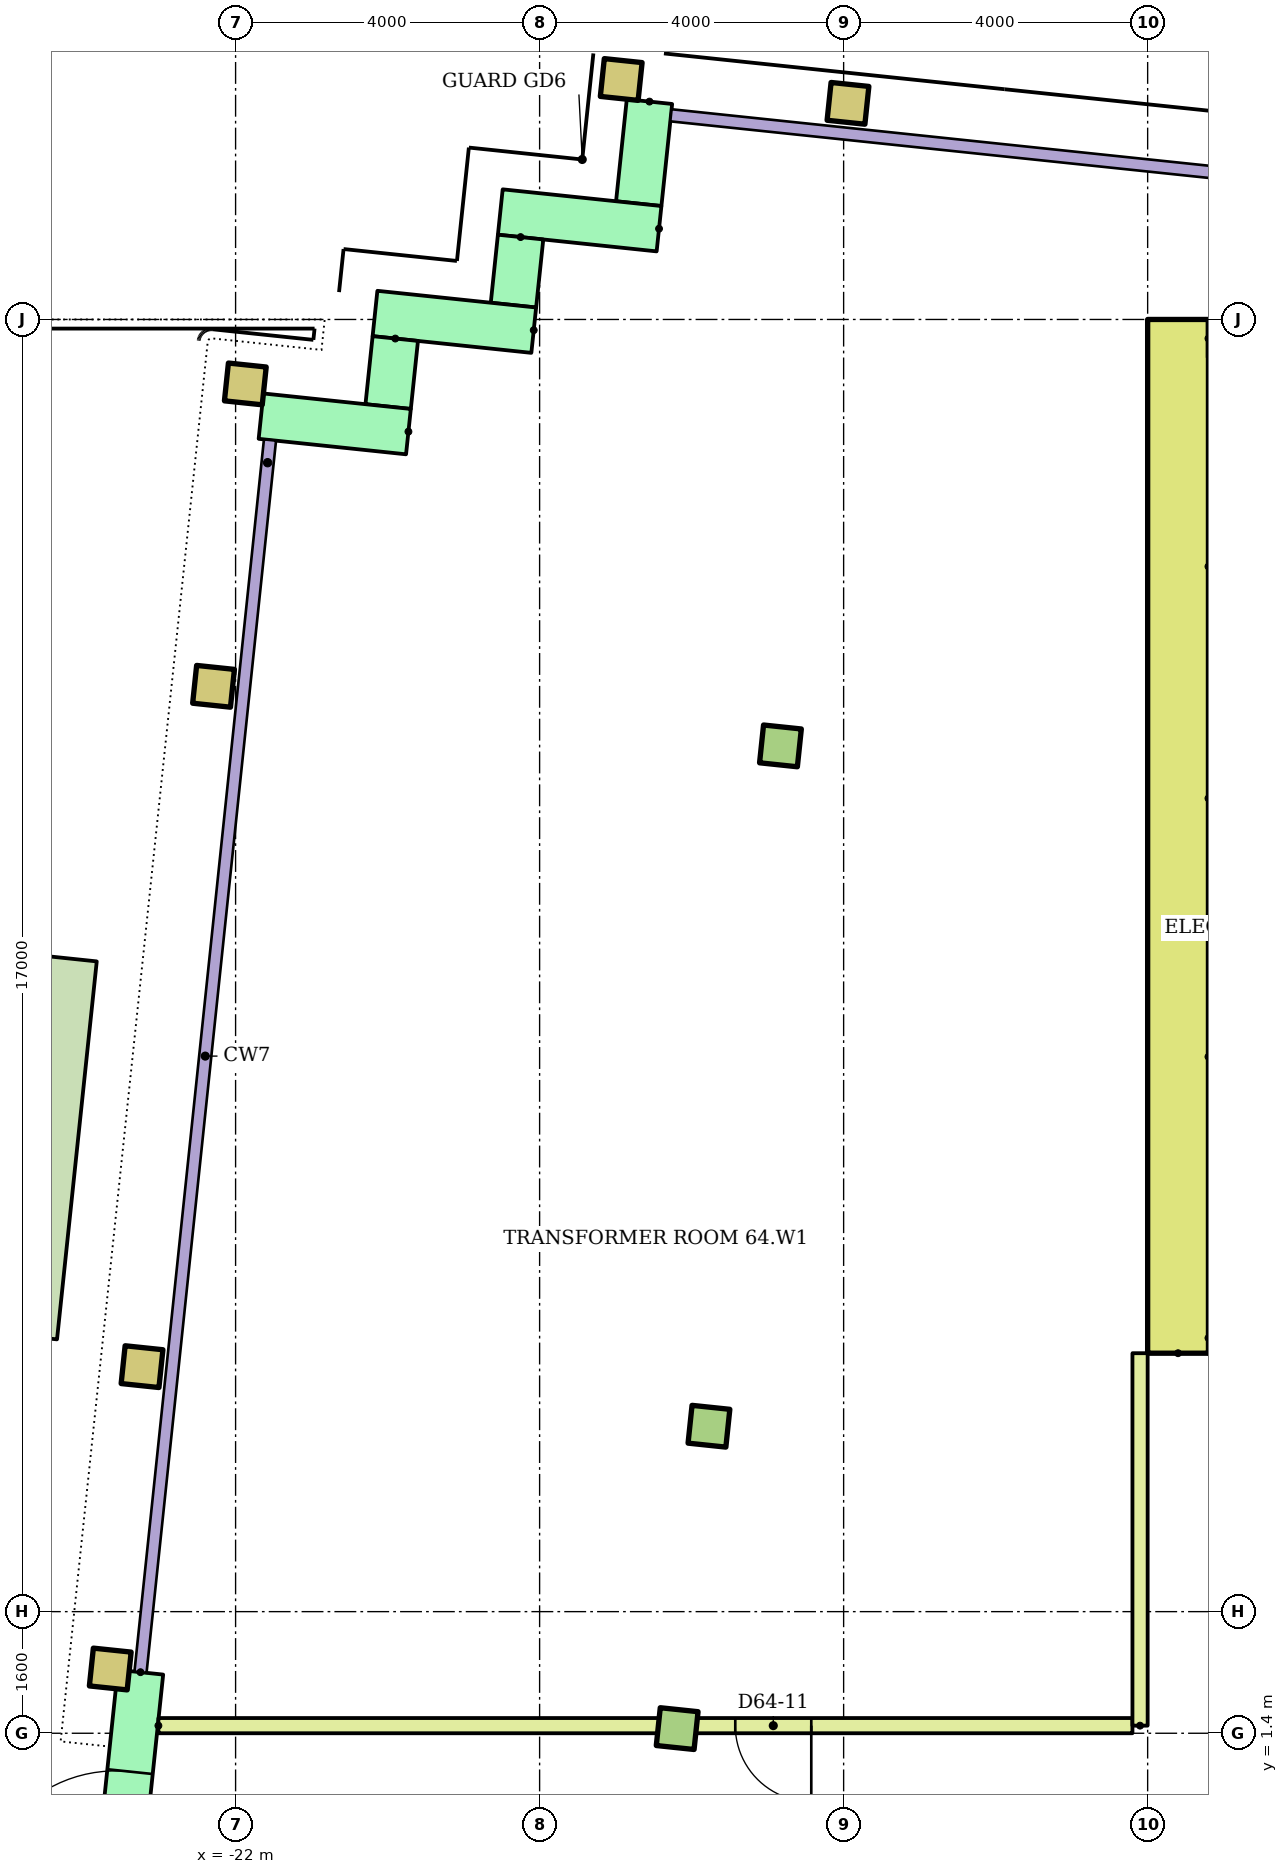
"""IFC4 building model, lengths in metres.
Left out: names, types, materials, properties, quantities, classifications, styles, units other than length and angle.
Written with IfcOpenShell. Run it as: python <this file> out.ifc"""

import sys

from ifc_helpers import new_model, si_unit, direction, frame, frame_2d, origin, origin_2d, place, context, subcontext, project, spatial, rectangle, hollow_rectangle, extrude, element, fill, save


model = new_model("IFC4")
c1 = context("Model", 3, precision=1e-05, world=origin(), true_north=direction((0.0, 1.0)))
c2 = subcontext(c1, "Body", "Model", "MODEL_VIEW")
j1 = project(units=[si_unit("LENGTHUNIT", "METRE"), si_unit("PLANEANGLEUNIT", "RADIAN")], contexts=[c1])
p1 = place(None, origin())
s1 = spatial("IfcSite", under=j1, at=p1, CompositionType="ELEMENT")
p2 = place(p1, origin())
s2 = spatial("IfcBuilding", under=s1, at=p2, CompositionType="ELEMENT")
p3 = place(p2, frame((0.0, 0.0, 249.2)))
s3 = spatial("IfcBuildingStorey", under=s2, at=p3, CompositionType="ELEMENT", Elevation=249.2)
p4 = place(p3, frame((-23.649, 2.245, 0.0), z_axis=(0.0, 0.0, 1.0), x_axis=(0.994521895368, -0.104528463268, 0.0)))
e1 = element("IfcColumn", 1, at=p4, inside=s3, PredefinedType="COLUMN", context=c2, shape_type="SweptSolid", body=[
    extrude(hollow_rectangle(XDim=0.5, YDim=0.5, WallThickness=0.025, at=origin_2d()), origin(), (0.0, 0.0, 1.0), 3.9),
])
p5 = place(p3, frame((-16.19, 1.461, 0.0), z_axis=(0.0, 0.0, 1.0), x_axis=(0.994521895368, -0.104528463268, 0.0)))
e2 = element("IfcColumn", 2, at=p5, inside=s3, PredefinedType="COLUMN", context=c2, shape_type="SweptSolid", body=[
    extrude(rectangle(XDim=0.5, YDim=0.5, at=origin_2d()), origin(), (0.0, 0.0, 1.0), 3.9),
])
p6 = place(p3, frame((-23.231, 6.223, 0.0), z_axis=(0.0, 0.0, 1.0), x_axis=(0.994521895368, -0.104528463268, 0.0)))
e3 = element("IfcColumn", 3, at=p6, inside=s3, PredefinedType="COLUMN", context=c2, shape_type="SweptSolid", body=[
    extrude(hollow_rectangle(XDim=0.5, YDim=0.5, WallThickness=0.025, at=origin_2d()), origin(), (0.0, 0.0, 1.0), 3.9),
])
p7 = place(p3, frame((-15.772, 5.439, 0.0), z_axis=(0.0, 0.0, 1.0), x_axis=(0.994521895368, -0.104528463268, 0.0)))
e4 = element("IfcColumn", 4, at=p7, inside=s3, PredefinedType="COLUMN", context=c2, shape_type="SweptSolid", body=[
    extrude(rectangle(XDim=0.5, YDim=0.5, at=origin_2d()), origin(), (0.0, 0.0, 1.0), 3.9),
])
p8 = place(p3, frame((-22.29, 15.174, 0.0), z_axis=(0.0, 0.0, 1.0), x_axis=(0.994521895368, -0.104528463268, 0.0)))
e5 = element("IfcColumn", 5, at=p8, inside=s3, PredefinedType="COLUMN", context=c2, shape_type="SweptSolid", body=[
    extrude(hollow_rectangle(XDim=0.5, YDim=0.5, WallThickness=0.025, at=origin_2d()), origin(), (0.0, 0.0, 1.0), 3.9),
])
p9 = place(p3, frame((-14.831, 14.39, 0.0), z_axis=(0.0, 0.0, 1.0), x_axis=(0.994521895368, -0.104528463268, 0.0)))
e6 = element("IfcColumn", 6, at=p9, inside=s3, PredefinedType="COLUMN", context=c2, shape_type="SweptSolid", body=[
    extrude(rectangle(XDim=0.5, YDim=0.5, at=origin_2d()), origin(), (0.0, 0.0, 1.0), 3.9),
])
for number, where, z_axis, x_axis in (
    (7, (-21.872, 19.152, 0.0), (0.0, 0.0, 1.0), (0.995, -0.105, 0.0)),
    (8, (-16.926, 23.157, 0.0), (0.0, 0.0, 1.0), (0.995, -0.105, 0.0)),
    (9, (-13.943, 22.843, 0.0), (0.0, 0.0, 1.0), (0.995, -0.105, 0.0)),
):
    element("IfcColumn", number, at=place(p3, frame(where, z_axis=z_axis, x_axis=x_axis)), inside=s3, PredefinedType="COLUMN", context=c2, shape_type="SweptSolid", body=[
        extrude(hollow_rectangle(XDim=0.5, YDim=0.5, WallThickness=0.025, at=origin_2d()), origin(), (0.0, 0.0, 1.0), 3.9),
    ])
p10 = place(p3, frame((-16.555, 22.866, 0.0), z_axis=(0.0, 0.0, 1.0), x_axis=(-0.104515354875, -0.994523273029, 0.0)))
e10 = element("IfcWall", 10, at=p10, inside=s3, PredefinedType="STANDARD", context=c2, shape_type="SweptSolid", body=[
    extrude(rectangle(XDim=1.35, YDim=0.6, at=frame_2d((0.675, 0.0))), origin(), (0.0, 0.0, 1.0), 3.62),
])
p11 = place(p3, frame((-16.429, 21.194, 0.0), z_axis=(0.0, 0.0, 1.0), x_axis=(-0.994522640205, 0.104521376379, 0.0)))
e11 = element("IfcWall", 11, at=p11, inside=s3, PredefinedType="STANDARD", context=c2, shape_type="SweptSolid", body=[
    extrude(rectangle(XDim=2.1, YDim=0.6, at=frame_2d((1.05, 0.0))), origin(), (0.0, 0.0, 1.0), 3.62),
])
p12 = place(p3, frame((-18.25, 21.084, 0.0), z_axis=(0.0, 0.0, 1.0), x_axis=(-0.104416541099, -0.994533652495, 0.0)))
e12 = element("IfcWall", 12, at=p12, inside=s3, PredefinedType="STANDARD", context=c2, shape_type="SweptSolid", body=[
    extrude(rectangle(XDim=0.9, YDim=0.6, at=frame_2d((0.45, 0.0))), origin(), (0.0, 0.0, 1.0), 3.62),
])
p13 = place(p3, frame((-18.077, 19.859, 0.0), z_axis=(0.0, 0.0, 1.0), x_axis=(-0.994522640205, 0.104521376379, 0.0)))
e13 = element("IfcWall", 13, at=p13, inside=s3, PredefinedType="STANDARD", context=c2, shape_type="SweptSolid", body=[
    extrude(rectangle(XDim=2.1, YDim=0.6, at=frame_2d((1.05, 0.0))), origin(), (0.0, 0.0, 1.0), 3.62),
])
p14 = place(p3, frame((-19.899, 19.749, 0.0), z_axis=(0.0, 0.0, 1.0), x_axis=(-0.104741284723, -0.994499503909, 0.0)))
e14 = element("IfcWall", 14, at=p14, inside=s3, PredefinedType="STANDARD", context=c2, shape_type="SweptSolid", body=[
    extrude(rectangle(XDim=0.9, YDim=0.6, at=frame_2d((0.45, 0.0))), origin(), (0.0, 0.0, 1.0), 3.62),
])
p15 = place(p3, frame((-19.726, 18.524, 0.0), z_axis=(0.0, 0.0, 1.0), x_axis=(-0.994534226826, 0.104411070641, 0.0)))
e15 = element("IfcWall", 15, at=p15, inside=s3, PredefinedType="STANDARD", context=c2, shape_type="SweptSolid", body=[
    extrude(rectangle(XDim=1.95, YDim=0.6, at=frame_2d((0.975, 0.0))), origin(), (0.0, 0.0, 1.0), 3.62),
])
p16 = place(p3, frame((-23.251, 2.203, 0.0), z_axis=(0.0, 0.0, 1.0), x_axis=(-0.104516482125, -0.994523154564, 0.0)))
e16 = element("IfcWall", 16, at=p16, inside=s3, PredefinedType="STANDARD", context=c2, shape_type="SweptSolid", body=[
    extrude(rectangle(XDim=7.4, YDim=0.6, at=frame_2d((3.7, 0.0))), origin(), (0.0, 0.0, 1.0), 3.62),
])
p17 = place(p16, frame((1.315, 0.0, 0.0)))
e17 = element("IfcOpeningElement", 17, at=p17, cuts=e16, PredefinedType="OPENING", context=c2, shape_type="SweptSolid", body=[
    extrude(rectangle(XDim=1.8, YDim=2.1, at=frame_2d((0.9, 1.05))), frame((0.0, 0.31, 0.0), z_axis=(0.0, -1.0, 0.0), x_axis=(1.0, 0.0, 0.0)), (0.0, 0.0, 1.0), 0.62),
])
p18 = place(p3, frame((-24.622, 11.638, 0.0), z_axis=(0.0, 0.0, 1.0), x_axis=(-0.104544982588, -0.994520158979, 0.0)))
e18 = element("IfcWall", 18, at=p18, inside=s3, PredefinedType="STANDARD", context=c2, shape_type="SweptSolid", body=[
    extrude(rectangle(XDim=5.0, YDim=1.6, at=frame_2d((2.5, 0.0))), origin(), (0.0, 0.0, 1.0), 0.8),
])
p19 = place(p3, frame((-9.6, 6.4, 0.0), z_axis=(0.0, 0.0, 1.0), x_axis=(0.0, 1.0, 0.0)))
e19 = element("IfcWall", 19, at=p19, inside=s3, PredefinedType="SHEAR", context=c2, shape_type="SweptSolid", body=[
    extrude(rectangle(XDim=13.6, YDim=0.8, at=frame_2d((6.8, 0.0))), origin(), (0.0, 0.0, 1.0), 3.62),
])
p20 = place(p3, frame((-23.016, 1.5, 0.0)))
e20 = element("IfcWall", 20, at=p20, inside=s3, PredefinedType="PARTITIONING", context=c2, shape_type="SweptSolid", body=[
    extrude(rectangle(XDim=12.816, YDim=0.2, at=frame_2d((6.408, 0.0))), origin(), (0.0, 0.0, 1.0), 3.62),
])
p21 = place(p20, frame((7.59, 0.0, 0.0)))
e21 = element("IfcOpeningElement", 21, at=p21, cuts=e20, PredefinedType="OPENING", context=c2, shape_type="SweptSolid", body=[
    extrude(rectangle(XDim=1.0, YDim=2.4, at=frame_2d((0.5, 1.2))), frame((0.0, 0.11, 0.0), z_axis=(0.0, -1.0, 0.0), x_axis=(1.0, 0.0, 0.0)), (0.0, 0.0, 1.0), 0.22),
])
p22 = place(p3, frame((-10.1, 1.5, 0.0), z_axis=(0.0, 0.0, 1.0), x_axis=(0.0, 1.0, 0.0)))
e22 = element("IfcWall", 22, at=p22, inside=s3, PredefinedType="PARTITIONING", context=c2, shape_type="SweptSolid", body=[
    extrude(rectangle(XDim=4.9, YDim=0.2, at=frame_2d((2.45, 0.0))), origin(), (0.0, 0.0, 1.0), 3.62),
])
p23 = place(p17, frame((1.8, 0.0, 0.0), z_axis=(0.0, 0.0, 1.0), x_axis=(-1.0, 0.0, 0.0)))
e23 = element("IfcDoor", 23, at=p23, inside=s3, OperationType="DOUBLE_DOOR_SINGLE_SWING", PredefinedType="DOOR", context=c2, shape_type="SweptSolid", body=[
    extrude(rectangle(XDim=1.8, YDim=2.1, at=frame_2d((0.9, 1.05))), frame((0.0, 0.025, 0.0), z_axis=(0.0, -1.0, 0.0), x_axis=(1.0, 0.0, 0.0)), (0.0, 0.0, 1.0), 0.05),
])
fill(e17, e23)
p24 = place(p21, frame((1.0, 0.0, 0.0), z_axis=(0.0, 0.0, 1.0), x_axis=(-1.0, 0.0, 0.0)))
e24 = element("IfcDoor", 24, at=p24, inside=s3, OperationType="SINGLE_SWING_RIGHT", PredefinedType="DOOR", context=c2, shape_type="SweptSolid", body=[
    extrude(rectangle(XDim=1.0, YDim=2.4, at=frame_2d((0.5, 1.2))), frame((0.0, 0.025, 0.0), z_axis=(0.0, -1.0, 0.0), x_axis=(1.0, 0.0, 0.0)), (0.0, 0.0, 1.0), 0.05),
])
fill(e21, e24)
save(model, sys.argv[1])
